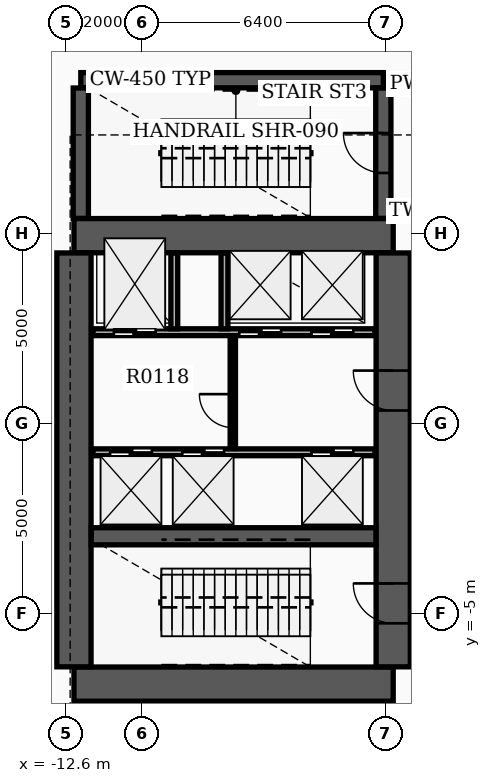
"""IFC4 building model, lengths in metres.
Left out: names, types, materials, properties, quantities, classifications, styles, units other than length and angle.
Written with IfcOpenShell. Run it as: python <this file> out.ifc"""

import sys

from ifc_helpers import new_model, si_unit, direction, frame, frame_2d, origin, place, context, subcontext, project, spatial, rectangle, extrude, element, fill, save


model = new_model("IFC4")
c1 = context("Model", 3, precision=1e-05, world=origin(), true_north=direction((0.0, 1.0)))
c2 = subcontext(c1, "Body", "Model", "MODEL_VIEW")
j1 = project(units=[si_unit("LENGTHUNIT", "METRE"), si_unit("PLANEANGLEUNIT", "RADIAN")], contexts=[c1])
p1 = place(None, origin())
s1 = spatial("IfcSite", under=j1, at=p1, CompositionType="ELEMENT")
p2 = place(p1, origin())
s2 = spatial("IfcBuilding", under=s1, at=p2, CompositionType="ELEMENT")
p3 = place(p2, origin())
s3 = spatial("IfcBuildingStorey", under=s2, at=p3, CompositionType="ELEMENT", Elevation=0.0)
for number, where, z_axis, x_axis in (
    (1, (-12.4, -6.85, 0.0), (0.0, 0.0, 1.0), (1.0, 0.0, 0.0)),
    (2, (-12.4, 4.95, 0.0), (0.0, 0.0, 1.0), (1.0, 0.0, 0.0)),
):
    element("IfcWall", number, at=place(p3, frame(where, z_axis=z_axis, x_axis=x_axis)), inside=s3, PredefinedType="SHEAR", context=c2, shape_type="SweptSolid", body=[
        extrude(rectangle(XDim=8.4, YDim=0.9, at=frame_2d((4.2, 0.0))), origin(), (0.0, 0.0, 1.0), 5.15),
    ])
p4 = place(p3, frame((-12.4, -6.395, 0.0), z_axis=(0.0, 0.0, 1.0), x_axis=(0.0, 1.0, 0.0)))
e3 = element("IfcWall", 3, at=p4, inside=s3, PredefinedType="SHEAR", context=c2, shape_type="SweptSolid", body=[
    extrude(rectangle(XDim=10.89, YDim=0.9, at=frame_2d((5.445, 0.0))), origin(), (0.0, 0.0, 1.0), 5.15),
])
p5 = place(p3, frame((-4.0, -6.395, 0.0), z_axis=(0.0, 0.0, 1.0), x_axis=(0.0, 1.0, 0.0)))
e4 = element("IfcWall", 4, at=p5, inside=s3, PredefinedType="SHEAR", context=c2, shape_type="SweptSolid", body=[
    extrude(rectangle(XDim=10.89, YDim=0.9, at=frame_2d((5.445, 0.0))), origin(), (0.0, 0.0, 1.0), 5.15),
])
p6 = place(p5, frame((1.145, 0.0, 0.0)))
e5 = element("IfcOpeningElement", 5, at=p6, cuts=e4, PredefinedType="OPENING", context=c2, shape_type="SweptSolid", body=[
    extrude(rectangle(XDim=1.05, YDim=2.15, at=frame_2d((0.525, 1.075))), frame((0.0, 0.46, 0.0), z_axis=(0.0, -1.0, 0.0), x_axis=(1.0, 0.0, 0.0)), (0.0, 0.0, 1.0), 0.92),
])
p7 = place(p5, frame((6.745, 0.0, 0.0)))
e6 = element("IfcOpeningElement", 6, at=p7, cuts=e4, PredefinedType="OPENING", context=c2, shape_type="SweptSolid", body=[
    extrude(rectangle(XDim=1.05, YDim=2.15, at=frame_2d((0.525, 1.075))), frame((0.0, 0.46, 0.0), z_axis=(0.0, -1.0, 0.0), x_axis=(1.0, 0.0, 0.0)), (0.0, 0.0, 1.0), 0.92),
])
p8 = place(p3, frame((-11.945, -2.96, 0.0), z_axis=(0.0, 0.0, 1.0), x_axis=(1.0, 0.0, 0.0)))
e7 = element("IfcWall", 7, at=p8, inside=s3, PredefinedType="SHEAR", context=c2, shape_type="SweptSolid", body=[
    extrude(rectangle(XDim=7.49, YDim=0.45, at=frame_2d((3.745, 0.0))), origin(), (0.0, 0.0, 1.0), 5.15),
])
p9 = place(p3, frame((-12.22, 9.04, 0.0), z_axis=(0.0, 0.0, 1.0), x_axis=(1.0, 0.0, 0.0)))
e8 = element("IfcWall", 8, at=p9, inside=s3, PredefinedType="SHEAR", context=c2, shape_type="SweptSolid", body=[
    extrude(rectangle(XDim=7.96, YDim=0.4, at=frame_2d((3.98, 0.0))), origin(), (0.0, 0.0, 1.0), 5.15),
])
p10 = place(p3, frame((-12.22, 5.405, 0.0), z_axis=(0.0, 0.0, 1.0), x_axis=(0.0, 1.0, 0.0)))
e9 = element("IfcWall", 9, at=p10, inside=s3, PredefinedType="SHEAR", context=c2, shape_type="SweptSolid", body=[
    extrude(rectangle(XDim=3.43, YDim=0.4, at=frame_2d((1.715, 0.0))), origin(), (0.0, 0.0, 1.0), 5.15),
])
p11 = place(p3, frame((-4.26, 5.405, 0.0), z_axis=(0.0, 0.0, 1.0), x_axis=(0.0, 1.0, 0.0)))
e10 = element("IfcWall", 10, at=p11, inside=s3, PredefinedType="SHEAR", context=c2, shape_type="SweptSolid", body=[
    extrude(rectangle(XDim=3.43, YDim=0.4, at=frame_2d((1.715, 0.0))), origin(), (0.0, 0.0, 1.0), 5.15),
])
p12 = place(p11, frame((1.195, 0.0, 0.0)))
e11 = element("IfcOpeningElement", 11, at=p12, cuts=e10, PredefinedType="OPENING", context=c2, shape_type="SweptSolid", body=[
    extrude(rectangle(XDim=1.05, YDim=2.15, at=frame_2d((0.525, 1.075))), frame((0.0, 0.21, 0.0), z_axis=(0.0, -1.0, 0.0), x_axis=(1.0, 0.0, 0.0)), (0.0, 0.0, 1.0), 0.42),
])
p13 = place(p3, frame((-11.9, 2.41, 0.0), z_axis=(0.0, 0.0, 1.0), x_axis=(1.0, 0.0, 0.0)))
e12 = element("IfcWall", 12, at=p13, inside=s3, PredefinedType="SOLIDWALL", context=c2, shape_type="SweptSolid", body=[
    extrude(rectangle(XDim=7.42, YDim=0.18, at=frame_2d((3.71, 0.0))), origin(), (0.0, 0.0, 1.0), 2.67),
])
p14 = place(p13, frame((0.55, 0.0, 0.0)))
e13 = element("IfcOpeningElement", 13, at=p14, cuts=e12, PredefinedType="OPENING", context=c2, shape_type="SweptSolid", body=[
    extrude(rectangle(XDim=1.1, YDim=2.15, at=frame_2d((0.55, 1.075))), frame((0.0, 0.1, 0.0), z_axis=(0.0, -1.0, 0.0), x_axis=(1.0, 0.0, 0.0)), (0.0, 0.0, 1.0), 0.2),
])
p15 = place(p13, frame((3.85, 0.0, 0.0)))
e14 = element("IfcOpeningElement", 14, at=p15, cuts=e12, PredefinedType="OPENING", context=c2, shape_type="SweptSolid", body=[
    extrude(rectangle(XDim=1.1, YDim=2.15, at=frame_2d((0.55, 1.075))), frame((0.0, 0.1, 0.0), z_axis=(0.0, -1.0, 0.0), x_axis=(1.0, 0.0, 0.0)), (0.0, 0.0, 1.0), 0.2),
])
p16 = place(p13, frame((5.75, 0.0, 0.0)))
e15 = element("IfcOpeningElement", 15, at=p16, cuts=e12, PredefinedType="OPENING", context=c2, shape_type="SweptSolid", body=[
    extrude(rectangle(XDim=1.1, YDim=2.15, at=frame_2d((0.55, 1.075))), frame((0.0, 0.1, 0.0), z_axis=(0.0, -1.0, 0.0), x_axis=(1.0, 0.0, 0.0)), (0.0, 0.0, 1.0), 0.2),
])
p17 = place(p3, frame((-11.9, -0.75, 0.0), z_axis=(0.0, 0.0, 1.0), x_axis=(1.0, 0.0, 0.0)))
e16 = element("IfcWall", 16, at=p17, inside=s3, PredefinedType="SOLIDWALL", context=c2, shape_type="SweptSolid", body=[
    extrude(rectangle(XDim=7.42, YDim=0.18, at=frame_2d((3.71, 0.0))), origin(), (0.0, 0.0, 1.0), 2.67),
])
p18 = place(p17, frame((0.45, 0.0, 0.0)))
e17 = element("IfcOpeningElement", 17, at=p18, cuts=e16, PredefinedType="OPENING", context=c2, shape_type="SweptSolid", body=[
    extrude(rectangle(XDim=1.1, YDim=2.15, at=frame_2d((0.55, 1.075))), frame((0.0, 0.1, 0.0), z_axis=(0.0, -1.0, 0.0), x_axis=(1.0, 0.0, 0.0)), (0.0, 0.0, 1.0), 0.2),
])
p19 = place(p17, frame((2.35, 0.0, 0.0)))
e18 = element("IfcOpeningElement", 18, at=p19, cuts=e16, PredefinedType="OPENING", context=c2, shape_type="SweptSolid", body=[
    extrude(rectangle(XDim=1.1, YDim=2.15, at=frame_2d((0.55, 1.075))), frame((0.0, 0.1, 0.0), z_axis=(0.0, -1.0, 0.0), x_axis=(1.0, 0.0, 0.0)), (0.0, 0.0, 1.0), 0.2),
])
p20 = place(p17, frame((5.75, 0.0, 0.0)))
e19 = element("IfcOpeningElement", 19, at=p20, cuts=e16, PredefinedType="OPENING", context=c2, shape_type="SweptSolid", body=[
    extrude(rectangle(XDim=1.1, YDim=2.15, at=frame_2d((0.55, 1.075))), frame((0.0, 0.1, 0.0), z_axis=(0.0, -1.0, 0.0), x_axis=(1.0, 0.0, 0.0)), (0.0, 0.0, 1.0), 0.2),
])
for number, where, z_axis, x_axis in (
    (20, (-9.76, 2.5, 0.0), (0.0, 0.0, 1.0), (0.0, 1.0, 0.0)),
    (21, (-8.44, 2.5, 0.0), (0.0, 0.0, 1.0), (0.0, 1.0, 0.0)),
):
    element("IfcWall", number, at=place(p3, frame(where, z_axis=z_axis, x_axis=x_axis)), inside=s3, PredefinedType="SOLIDWALL", context=c2, shape_type="SweptSolid", body=[
        extrude(rectangle(XDim=1.99, YDim=0.18, at=frame_2d((0.995, 0.0))), origin(), (0.0, 0.0, 1.0), 2.67),
    ])
p21 = place(p3, frame((-8.22, -0.65, 0.0), z_axis=(0.0, 0.0, 1.0), x_axis=(0.0, 1.0, 0.0)))
e22 = element("IfcWall", 22, at=p21, inside=s3, PredefinedType="SOLIDWALL", context=c2, shape_type="SweptSolid", body=[
    extrude(rectangle(XDim=2.96, YDim=0.14, at=frame_2d((1.48, 0.0))), origin(), (0.0, 0.0, 1.0), 2.67),
])
p22 = place(p21, frame((0.55, 0.0, 0.0)))
e23 = element("IfcOpeningElement", 23, at=p22, cuts=e22, PredefinedType="OPENING", context=c2, shape_type="SweptSolid", body=[
    extrude(rectangle(XDim=0.88, YDim=2.1, at=frame_2d((0.44, 1.05))), frame((0.0, 0.08, 0.0), z_axis=(0.0, -1.0, 0.0), x_axis=(1.0, 0.0, 0.0)), (0.0, 0.0, 1.0), 0.16),
])
p23 = place(p3, frame((-3.6, 8.95, 0.0), z_axis=(0.0, 0.0, 1.0), x_axis=(1.0, 0.0, 0.0)))
e24 = element("IfcWall", 24, at=p23, inside=s3, PredefinedType="PARTITIONING", context=c2, shape_type="SweptSolid", body=[
    extrude(rectangle(XDim=7.2, YDim=0.2, at=frame_2d((3.6, 0.0))), origin(), (0.0, 0.0, 1.0), 2.67),
])
p24 = place(p23, frame((2.85, 0.0, 0.0)))
e25 = element("IfcOpeningElement", 25, at=p24, cuts=e24, PredefinedType="OPENING", context=c2, shape_type="SweptSolid", body=[
    extrude(rectangle(XDim=1.5, YDim=2.15, at=frame_2d((0.75, 1.075))), frame((0.0, 0.11, 0.0), z_axis=(0.0, -1.0, 0.0), x_axis=(1.0, 0.0, 0.0)), (0.0, 0.0, 1.0), 0.22),
])
p25 = place(p6, origin())
e26 = element("IfcDoor", 26, at=p25, inside=s3, OperationType="SINGLE_SWING_RIGHT", PredefinedType="DOOR", context=c2, shape_type="SweptSolid", body=[
    extrude(rectangle(XDim=1.05, YDim=2.15, at=frame_2d((0.525, 1.075))), frame((0.0, 0.025, 0.0), z_axis=(0.0, -1.0, 0.0), x_axis=(1.0, 0.0, 0.0)), (0.0, 0.0, 1.0), 0.05),
])
fill(e5, e26)
p26 = place(p7, origin())
e27 = element("IfcDoor", 27, at=p26, inside=s3, OperationType="SINGLE_SWING_RIGHT", PredefinedType="DOOR", context=c2, shape_type="SweptSolid", body=[
    extrude(rectangle(XDim=1.05, YDim=2.15, at=frame_2d((0.525, 1.075))), frame((0.0, 0.025, 0.0), z_axis=(0.0, -1.0, 0.0), x_axis=(1.0, 0.0, 0.0)), (0.0, 0.0, 1.0), 0.05),
])
fill(e6, e27)
p27 = place(p12, origin())
e28 = element("IfcDoor", 28, at=p27, inside=s3, OperationType="SINGLE_SWING_RIGHT", PredefinedType="DOOR", context=c2, shape_type="SweptSolid", body=[
    extrude(rectangle(XDim=1.05, YDim=2.15, at=frame_2d((0.525, 1.075))), frame((0.0, 0.025, 0.0), z_axis=(0.0, -1.0, 0.0), x_axis=(1.0, 0.0, 0.0)), (0.0, 0.0, 1.0), 0.05),
])
fill(e11, e28)
p28 = place(p14, origin())
e29 = element("IfcDoor", 29, at=p28, inside=s3, OperationType="DOUBLE_DOOR_SLIDING", PredefinedType="DOOR", context=c2, shape_type="SweptSolid", body=[
    extrude(rectangle(XDim=1.1, YDim=2.15, at=frame_2d((0.55, 1.075))), frame((0.0, 0.025, 0.0), z_axis=(0.0, -1.0, 0.0), x_axis=(1.0, 0.0, 0.0)), (0.0, 0.0, 1.0), 0.05),
])
fill(e13, e29)
p29 = place(p15, origin())
e30 = element("IfcDoor", 30, at=p29, inside=s3, OperationType="DOUBLE_DOOR_SLIDING", PredefinedType="DOOR", context=c2, shape_type="SweptSolid", body=[
    extrude(rectangle(XDim=1.1, YDim=2.15, at=frame_2d((0.55, 1.075))), frame((0.0, 0.025, 0.0), z_axis=(0.0, -1.0, 0.0), x_axis=(1.0, 0.0, 0.0)), (0.0, 0.0, 1.0), 0.05),
])
fill(e14, e30)
p30 = place(p16, origin())
e31 = element("IfcDoor", 31, at=p30, inside=s3, OperationType="DOUBLE_DOOR_SLIDING", PredefinedType="DOOR", context=c2, shape_type="SweptSolid", body=[
    extrude(rectangle(XDim=1.1, YDim=2.15, at=frame_2d((0.55, 1.075))), frame((0.0, 0.025, 0.0), z_axis=(0.0, -1.0, 0.0), x_axis=(1.0, 0.0, 0.0)), (0.0, 0.0, 1.0), 0.05),
])
fill(e15, e31)
p31 = place(p18, origin())
e32 = element("IfcDoor", 32, at=p31, inside=s3, OperationType="DOUBLE_DOOR_SLIDING", PredefinedType="DOOR", context=c2, shape_type="SweptSolid", body=[
    extrude(rectangle(XDim=1.1, YDim=2.15, at=frame_2d((0.55, 1.075))), frame((0.0, 0.025, 0.0), z_axis=(0.0, -1.0, 0.0), x_axis=(1.0, 0.0, 0.0)), (0.0, 0.0, 1.0), 0.05),
])
fill(e17, e32)
p32 = place(p19, origin())
e33 = element("IfcDoor", 33, at=p32, inside=s3, OperationType="DOUBLE_DOOR_SLIDING", PredefinedType="DOOR", context=c2, shape_type="SweptSolid", body=[
    extrude(rectangle(XDim=1.1, YDim=2.15, at=frame_2d((0.55, 1.075))), frame((0.0, 0.025, 0.0), z_axis=(0.0, -1.0, 0.0), x_axis=(1.0, 0.0, 0.0)), (0.0, 0.0, 1.0), 0.05),
])
fill(e18, e33)
p33 = place(p20, origin())
e34 = element("IfcDoor", 34, at=p33, inside=s3, OperationType="DOUBLE_DOOR_SLIDING", PredefinedType="DOOR", context=c2, shape_type="SweptSolid", body=[
    extrude(rectangle(XDim=1.1, YDim=2.15, at=frame_2d((0.55, 1.075))), frame((0.0, 0.025, 0.0), z_axis=(0.0, -1.0, 0.0), x_axis=(1.0, 0.0, 0.0)), (0.0, 0.0, 1.0), 0.05),
])
fill(e19, e34)
p34 = place(p22, origin())
e35 = element("IfcDoor", 35, at=p34, inside=s3, OperationType="SINGLE_SWING_RIGHT", PredefinedType="DOOR", context=c2, shape_type="SweptSolid", body=[
    extrude(rectangle(XDim=0.88, YDim=2.1, at=frame_2d((0.44, 1.05))), frame((0.0, 0.025, 0.0), z_axis=(0.0, -1.0, 0.0), x_axis=(1.0, 0.0, 0.0)), (0.0, 0.0, 1.0), 0.05),
])
fill(e23, e35)
save(model, sys.argv[1])
